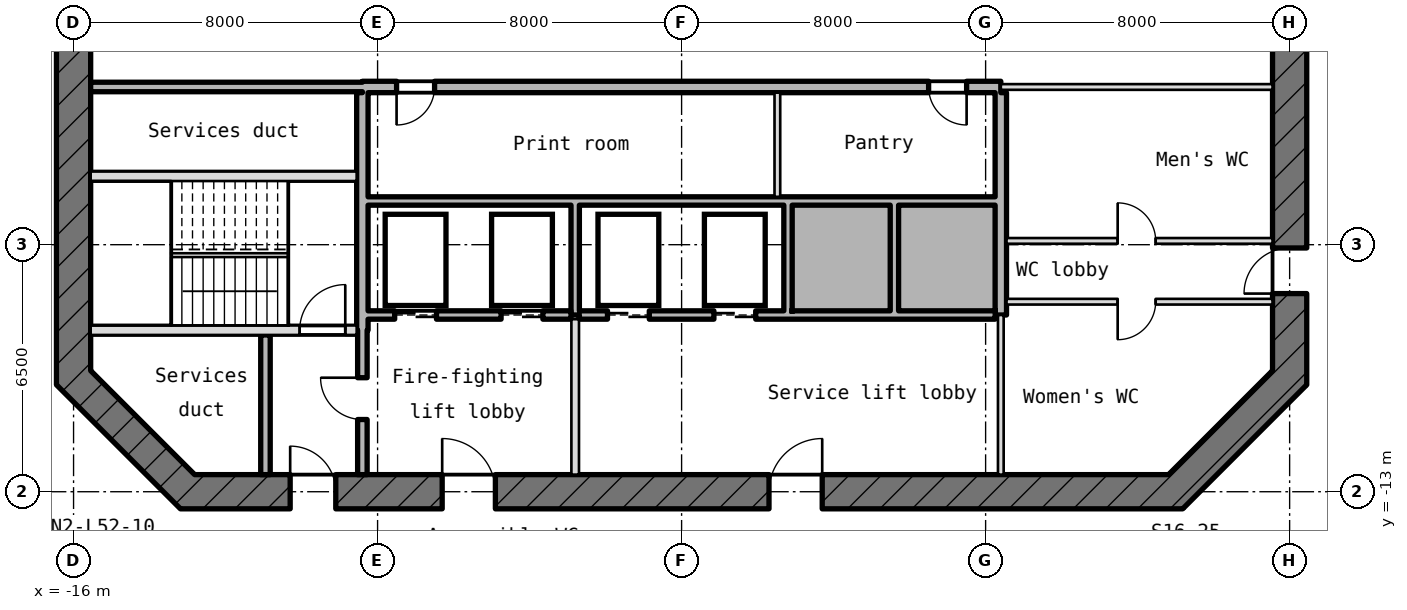
"""IFC4 building model, lengths in metres.
Left out: names, types, materials, properties, quantities, classifications, styles, units other than length and angle.
Written with IfcOpenShell. Run it as: python <this file> out.ifc"""

import sys

from ifc_helpers import new_model, si_unit, direction, frame, frame_2d, origin, place, context, subcontext, project, spatial, rectangle, extrude, element, fill, save


model = new_model("IFC4")
c1 = context("Model", 3, precision=1e-05, world=origin(), true_north=direction((0.0, 1.0)))
c2 = subcontext(c1, "Body", "Model", "MODEL_VIEW")
j1 = project(units=[si_unit("LENGTHUNIT", "METRE"), si_unit("PLANEANGLEUNIT", "RADIAN")], contexts=[c1])
p1 = place(None, origin())
s1 = spatial("IfcSite", under=j1, at=p1, CompositionType="ELEMENT")
p2 = place(p1, origin())
s2 = spatial("IfcBuilding", under=s1, at=p2, CompositionType="ELEMENT")
p3 = place(p2, frame((0.0, 0.0, 235.75)))
s3 = spatial("IfcBuildingStorey", under=s2, at=p3, CompositionType="ELEMENT", Elevation=235.75)
p4 = place(p3, frame((12.868, -13.132, -0.18), z_axis=(0.0, 0.0, 1.0), x_axis=(0.707106781187, 0.707106781187, 0.0)))
e1 = element("IfcWall", 1, at=p4, inside=s3, PredefinedType="SHEAR", context=c2, shape_type="SweptSolid", body=[
    extrude(rectangle(XDim=4.615, YDim=0.9, at=frame_2d((2.308, 0.0))), origin(), (0.0, 0.0, 1.0), 4.15),
])
p5 = place(p3, frame((16.0, -10.186, -0.18), z_axis=(0.0, 0.0, 1.0), x_axis=(0.0, 1.0, 0.0)))
e2 = element("IfcWall", 2, at=p5, inside=s3, PredefinedType="SHEAR", context=c2, shape_type="SweptSolid", body=[
    extrude(rectangle(XDim=20.373, YDim=0.9, at=frame_2d((10.186, 0.0))), origin(), (0.0, 0.0, 1.0), 4.15),
])
p6 = place(p5, frame((8.986, 0.0, 0.18)))
e3 = element("IfcOpeningElement", 3, at=p6, cuts=e2, PredefinedType="OPENING", context=c2, shape_type="SweptSolid", body=[
    extrude(rectangle(XDim=2.4, YDim=2.1, at=frame_2d((1.2, 1.05))), frame((0.0, 0.46, 0.0), z_axis=(0.0, -1.0, 0.0), x_axis=(1.0, 0.0, 0.0)), (0.0, 0.0, 1.0), 0.92),
])
p7 = place(p5, frame((13.586, 0.0, 0.18)))
e4 = element("IfcOpeningElement", 4, at=p7, cuts=e2, PredefinedType="OPENING", context=c2, shape_type="SweptSolid", body=[
    extrude(rectangle(XDim=1.2, YDim=2.1, at=frame_2d((0.6, 1.05))), frame((0.0, 0.46, 0.0), z_axis=(0.0, -1.0, 0.0), x_axis=(1.0, 0.0, 0.0)), (0.0, 0.0, 1.0), 0.92),
])
p8 = place(p5, frame((2.4, 0.0, 0.18)))
e5 = element("IfcOpeningElement", 5, at=p8, cuts=e2, PredefinedType="OPENING", context=c2, shape_type="SweptSolid", body=[
    extrude(rectangle(XDim=1.2, YDim=2.1, at=frame_2d((0.6, 1.05))), frame((0.0, 0.46, 0.0), z_axis=(0.0, -1.0, 0.0), x_axis=(1.0, 0.0, 0.0)), (0.0, 0.0, 1.0), 0.92),
])
p9 = place(p3, frame((-16.0, 10.186, -0.18), z_axis=(0.0, 0.0, 1.0), x_axis=(0.0, -1.0, 0.0)))
e6 = element("IfcWall", 6, at=p9, inside=s3, PredefinedType="SHEAR", context=c2, shape_type="SweptSolid", body=[
    extrude(rectangle(XDim=20.373, YDim=0.9, at=frame_2d((10.186, 0.0))), origin(), (0.0, 0.0, 1.0), 4.15),
])
p10 = place(p9, frame((8.986, 0.0, 0.18)))
e7 = element("IfcOpeningElement", 7, at=p10, cuts=e6, PredefinedType="OPENING", context=c2, shape_type="SweptSolid", body=[
    extrude(rectangle(XDim=2.4, YDim=2.1, at=frame_2d((1.2, 1.05))), frame((0.0, 0.46, 0.0), z_axis=(0.0, -1.0, 0.0), x_axis=(1.0, 0.0, 0.0)), (0.0, 0.0, 1.0), 0.92),
])
p11 = place(p9, frame((5.586, 0.0, 0.18)))
e8 = element("IfcOpeningElement", 8, at=p11, cuts=e6, PredefinedType="OPENING", context=c2, shape_type="SweptSolid", body=[
    extrude(rectangle(XDim=1.2, YDim=2.1, at=frame_2d((0.6, 1.05))), frame((0.0, 0.46, 0.0), z_axis=(0.0, -1.0, 0.0), x_axis=(1.0, 0.0, 0.0)), (0.0, 0.0, 1.0), 0.92),
])
p12 = place(p3, frame((-16.132, -9.868, -0.18), z_axis=(0.0, 0.0, 1.0), x_axis=(0.707106781187, -0.707106781187, 0.0)))
e9 = element("IfcWall", 9, at=p12, inside=s3, PredefinedType="SHEAR", context=c2, shape_type="SweptSolid", body=[
    extrude(rectangle(XDim=4.615, YDim=0.9, at=frame_2d((2.308, 0.0))), origin(), (0.0, 0.0, 1.0), 4.15),
])
p13 = place(p3, frame((-13.186, -13.0, -0.18), z_axis=(0.0, 0.0, 1.0), x_axis=(1.0, 0.0, 0.0)))
e10 = element("IfcWall", 10, at=p13, inside=s3, PredefinedType="SHEAR", context=c2, shape_type="SweptSolid", body=[
    extrude(rectangle(XDim=26.373, YDim=0.9, at=frame_2d((13.186, 0.0))), origin(), (0.0, 0.0, 1.0), 4.15),
])
p14 = place(p13, frame((2.886, 0.0, 0.18)))
e11 = element("IfcOpeningElement", 11, at=p14, cuts=e10, PredefinedType="OPENING", context=c2, shape_type="SweptSolid", body=[
    extrude(rectangle(XDim=1.2, YDim=2.1, at=frame_2d((0.6, 1.05))), frame((0.0, 0.46, 0.0), z_axis=(0.0, -1.0, 0.0), x_axis=(1.0, 0.0, 0.0)), (0.0, 0.0, 1.0), 0.92),
])
p15 = place(p13, frame((6.886, 0.0, 0.18)))
e12 = element("IfcOpeningElement", 12, at=p15, cuts=e10, PredefinedType="OPENING", context=c2, shape_type="SweptSolid", body=[
    extrude(rectangle(XDim=1.4, YDim=2.1, at=frame_2d((0.7, 1.05))), frame((0.0, 0.46, 0.0), z_axis=(0.0, -1.0, 0.0), x_axis=(1.0, 0.0, 0.0)), (0.0, 0.0, 1.0), 0.92),
])
p16 = place(p13, frame((15.486, 0.0, 0.18)))
e13 = element("IfcOpeningElement", 13, at=p16, cuts=e10, PredefinedType="OPENING", context=c2, shape_type="SweptSolid", body=[
    extrude(rectangle(XDim=1.4, YDim=2.1, at=frame_2d((0.7, 1.05))), frame((0.0, 0.46, 0.0), z_axis=(0.0, -1.0, 0.0), x_axis=(1.0, 0.0, 0.0)), (0.0, 0.0, 1.0), 0.92),
])
p17 = place(p3, frame((-15.55, -8.75, -0.18), z_axis=(0.0, 0.0, 1.0), x_axis=(1.0, 0.0, 0.0)))
e14 = element("IfcWall", 14, at=p17, inside=s3, PredefinedType="SHEAR", context=c2, shape_type="SweptSolid", body=[
    extrude(rectangle(XDim=7.0, YDim=0.25, at=frame_2d((3.5, 0.0))), origin(), (0.0, 0.0, 1.0), 4.15),
])
p18 = place(p17, frame((5.5, 0.0, 0.18)))
e15 = element("IfcOpeningElement", 15, at=p18, cuts=e14, PredefinedType="OPENING", context=c2, shape_type="SweptSolid", body=[
    extrude(rectangle(XDim=1.2, YDim=2.1, at=frame_2d((0.6, 1.05))), frame((0.0, 0.135, 0.0), z_axis=(0.0, -1.0, 0.0), x_axis=(1.0, 0.0, 0.0)), (0.0, 0.0, 1.0), 0.27),
])
p19 = place(p3, frame((-8.25, -8.35, 0.0), z_axis=(0.0, 0.0, 1.0), x_axis=(1.0, 0.0, 0.0)))
e16 = element("IfcWall", 16, at=p19, inside=s3, PredefinedType="STANDARD", context=c2, shape_type="SweptSolid", body=[
    extrude(rectangle(XDim=5.34, YDim=0.22, at=frame_2d((2.67, 0.0))), origin(), (0.0, 0.0, 1.0), 3.97),
])
p20 = place(p19, frame((0.7, 0.0, 0.0)))
e17 = element("IfcOpeningElement", 17, at=p20, cuts=e16, PredefinedType="OPENING", context=c2, shape_type="SweptSolid", body=[
    extrude(rectangle(XDim=1.1, YDim=2.1, at=frame_2d((0.55, 1.05))), frame((0.0, 0.12, 0.0), z_axis=(0.0, -1.0, 0.0), x_axis=(1.0, 0.0, 0.0)), (0.0, 0.0, 1.0), 0.24),
])
p21 = place(p19, frame((3.5, 0.0, 0.0)))
e18 = element("IfcOpeningElement", 18, at=p21, cuts=e16, PredefinedType="OPENING", context=c2, shape_type="SweptSolid", body=[
    extrude(rectangle(XDim=1.1, YDim=2.1, at=frame_2d((0.55, 1.05))), frame((0.0, 0.12, 0.0), z_axis=(0.0, -1.0, 0.0), x_axis=(1.0, 0.0, 0.0)), (0.0, 0.0, 1.0), 0.24),
])
p22 = place(p3, frame((-2.69, -8.35, 0.0), z_axis=(0.0, 0.0, 1.0), x_axis=(1.0, 0.0, 0.0)))
e19 = element("IfcWall", 19, at=p22, inside=s3, PredefinedType="STANDARD", context=c2, shape_type="SweptSolid", body=[
    extrude(rectangle(XDim=10.94, YDim=0.22, at=frame_2d((5.47, 0.0))), origin(), (0.0, 0.0, 1.0), 3.97),
])
p23 = place(p22, frame((0.74, 0.0, 0.0)))
e20 = element("IfcOpeningElement", 20, at=p23, cuts=e19, PredefinedType="OPENING", context=c2, shape_type="SweptSolid", body=[
    extrude(rectangle(XDim=1.1, YDim=2.1, at=frame_2d((0.55, 1.05))), frame((0.0, 0.12, 0.0), z_axis=(0.0, -1.0, 0.0), x_axis=(1.0, 0.0, 0.0)), (0.0, 0.0, 1.0), 0.24),
])
p24 = place(p22, frame((3.54, 0.0, 0.0)))
e21 = element("IfcOpeningElement", 21, at=p24, cuts=e19, PredefinedType="OPENING", context=c2, shape_type="SweptSolid", body=[
    extrude(rectangle(XDim=1.1, YDim=2.1, at=frame_2d((0.55, 1.05))), frame((0.0, 0.12, 0.0), z_axis=(0.0, -1.0, 0.0), x_axis=(1.0, 0.0, 0.0)), (0.0, 0.0, 1.0), 0.24),
])
p25 = place(p3, frame((8.55, -8.0, 0.0), z_axis=(0.0, 0.0, 1.0), x_axis=(1.0, 0.0, 0.0)))
e22 = element("IfcWall", 22, at=p25, inside=s3, PredefinedType="PARTITIONING", context=c2, shape_type="SweptSolid", body=[
    extrude(rectangle(XDim=7.0, YDim=0.15, at=frame_2d((3.5, 0.0))), origin(), (0.0, 0.0, 1.0), 3.97),
])
p26 = place(p25, frame((2.925, 0.0, 0.0)))
e23 = element("IfcOpeningElement", 23, at=p26, cuts=e22, PredefinedType="OPENING", context=c2, shape_type="SweptSolid", body=[
    extrude(rectangle(XDim=1.0, YDim=2.1, at=frame_2d((0.5, 1.05))), frame((0.0, 0.085, 0.0), z_axis=(0.0, -1.0, 0.0), x_axis=(1.0, 0.0, 0.0)), (0.0, 0.0, 1.0), 0.17),
])
p27 = place(p3, frame((8.55, -6.4, 0.0), z_axis=(0.0, 0.0, 1.0), x_axis=(1.0, 0.0, 0.0)))
e24 = element("IfcWall", 24, at=p27, inside=s3, PredefinedType="PARTITIONING", context=c2, shape_type="SweptSolid", body=[
    extrude(rectangle(XDim=7.0, YDim=0.15, at=frame_2d((3.5, 0.0))), origin(), (0.0, 0.0, 1.0), 3.97),
])
p28 = place(p27, frame((2.925, 0.0, 0.0)))
e25 = element("IfcOpeningElement", 25, at=p28, cuts=e24, PredefinedType="OPENING", context=c2, shape_type="SweptSolid", body=[
    extrude(rectangle(XDim=1.0, YDim=2.1, at=frame_2d((0.5, 1.05))), frame((0.0, 0.085, 0.0), z_axis=(0.0, -1.0, 0.0), x_axis=(1.0, 0.0, 0.0)), (0.0, 0.0, 1.0), 0.17),
])
p29 = place(p3, frame((-8.25, -5.35, 0.0), z_axis=(0.0, 0.0, 1.0), x_axis=(1.0, 0.0, 0.0)))
e26 = element("IfcWall", 26, at=p29, inside=s3, PredefinedType="STANDARD", context=c2, shape_type="SweptSolid", body=[
    extrude(rectangle(XDim=16.5, YDim=0.22, at=frame_2d((8.25, 0.0))), origin(), (0.0, 0.0, 1.0), 3.97),
])
p30 = place(p3, frame((-15.55, -4.7, -0.18), z_axis=(0.0, 0.0, 1.0), x_axis=(1.0, 0.0, 0.0)))
e27 = element("IfcWall", 27, at=p30, inside=s3, PredefinedType="SHEAR", context=c2, shape_type="SweptSolid", body=[
    extrude(rectangle(XDim=7.0, YDim=0.25, at=frame_2d((3.5, 0.0))), origin(), (0.0, 0.0, 1.0), 4.15),
])
p31 = place(p3, frame((-15.55, -2.35, 0.0), z_axis=(0.0, 0.0, 1.0), x_axis=(1.0, 0.0, 0.0)))
e28 = element("IfcWall", 28, at=p31, inside=s3, PredefinedType="STANDARD", context=c2, shape_type="SweptSolid", body=[
    extrude(rectangle(XDim=7.15, YDim=0.25, at=frame_2d((3.575, 0.0))), origin(), (0.0, 0.0, 1.0), 3.97),
])
p32 = place(p3, frame((-8.4, -2.35, -0.18), z_axis=(0.0, 0.0, 1.0), x_axis=(1.0, 0.0, 0.0)))
e29 = element("IfcWall", 29, at=p32, inside=s3, PredefinedType="SHEAR", context=c2, shape_type="SweptSolid", body=[
    extrude(rectangle(XDim=16.8, YDim=0.3, at=frame_2d((8.4, 0.0))), origin(), (0.0, 0.0, 1.0), 4.15),
])
p33 = place(p32, frame((0.9, 0.0, 0.18)))
e30 = element("IfcOpeningElement", 30, at=p33, cuts=e29, PredefinedType="OPENING", context=c2, shape_type="SweptSolid", body=[
    extrude(rectangle(XDim=1.0, YDim=2.1, at=frame_2d((0.5, 1.05))), frame((0.0, 0.16, 0.0), z_axis=(0.0, -1.0, 0.0), x_axis=(1.0, 0.0, 0.0)), (0.0, 0.0, 1.0), 0.32),
])
p34 = place(p32, frame((14.9, 0.0, 0.18)))
e31 = element("IfcOpeningElement", 31, at=p34, cuts=e29, PredefinedType="OPENING", context=c2, shape_type="SweptSolid", body=[
    extrude(rectangle(XDim=1.0, YDim=2.1, at=frame_2d((0.5, 1.05))), frame((0.0, 0.16, 0.0), z_axis=(0.0, -1.0, 0.0), x_axis=(1.0, 0.0, 0.0)), (0.0, 0.0, 1.0), 0.32),
])
p35 = place(p3, frame((8.4, -2.35, 0.0), z_axis=(0.0, 0.0, 1.0), x_axis=(1.0, 0.0, 0.0)))
e32 = element("IfcWall", 32, at=p35, inside=s3, PredefinedType="PARTITIONING", context=c2, shape_type="SweptSolid", body=[
    extrude(rectangle(XDim=7.15, YDim=0.15, at=frame_2d((3.575, 0.0))), origin(), (0.0, 0.0, 1.0), 3.97),
])
p36 = place(p3, frame((-10.95, -12.55, 0.0), z_axis=(0.0, 0.0, 1.0), x_axis=(0.0, 1.0, 0.0)))
e33 = element("IfcWall", 33, at=p36, inside=s3, PredefinedType="STANDARD", context=c2, shape_type="SweptSolid", body=[
    extrude(rectangle(XDim=3.675, YDim=0.25, at=frame_2d((1.837, 0.0))), origin(), (0.0, 0.0, 1.0), 3.97),
])
p37 = place(p3, frame((-8.4, -12.55, 0.0), z_axis=(0.0, 0.0, 1.0), x_axis=(0.0, 1.0, 0.0)))
e34 = element("IfcWall", 34, at=p37, inside=s3, PredefinedType="STANDARD", context=c2, shape_type="SweptSolid", body=[
    extrude(rectangle(XDim=3.8, YDim=0.25, at=frame_2d((1.9, 0.0))), origin(), (0.0, 0.0, 1.0), 3.97),
])
p38 = place(p37, frame((1.45, 0.0, 0.0)))
e35 = element("IfcOpeningElement", 35, at=p38, cuts=e34, PredefinedType="OPENING", context=c2, shape_type="SweptSolid", body=[
    extrude(rectangle(XDim=1.1, YDim=2.1, at=frame_2d((0.55, 1.05))), frame((0.0, 0.135, 0.0), z_axis=(0.0, -1.0, 0.0), x_axis=(1.0, 0.0, 0.0)), (0.0, 0.0, 1.0), 0.27),
])
p39 = place(p3, frame((-8.4, -8.75, -0.18), z_axis=(0.0, 0.0, 1.0), x_axis=(0.0, 1.0, 0.0)))
e36 = element("IfcWall", 36, at=p39, inside=s3, PredefinedType="SHEAR", context=c2, shape_type="SweptSolid", body=[
    extrude(rectangle(XDim=6.25, YDim=0.3, at=frame_2d((3.125, 0.0))), origin(), (0.0, 0.0, 1.0), 4.15),
])
p40 = place(p3, frame((-2.8, -12.55, 0.0), z_axis=(0.0, 0.0, 1.0), x_axis=(0.0, 1.0, 0.0)))
e37 = element("IfcWall", 37, at=p40, inside=s3, PredefinedType="PARTITIONING", context=c2, shape_type="SweptSolid", body=[
    extrude(rectangle(XDim=4.09, YDim=0.2, at=frame_2d((2.045, 0.0))), origin(), (0.0, 0.0, 1.0), 3.97),
])
p41 = place(p3, frame((-2.8, -8.35, 0.0), z_axis=(0.0, 0.0, 1.0), x_axis=(0.0, 1.0, 0.0)))
e38 = element("IfcWall", 38, at=p41, inside=s3, PredefinedType="STANDARD", context=c2, shape_type="SweptSolid", body=[
    extrude(rectangle(XDim=2.89, YDim=0.22, at=frame_2d((1.445, 0.0))), origin(), (0.0, 0.0, 1.0), 3.97),
])
p42 = place(p3, frame((2.52, -5.24, 0.0), z_axis=(0.0, 0.0, 1.0), x_axis=(0.0, 1.0, 0.0)))
e39 = element("IfcWall", 39, at=p42, inside=s3, PredefinedType="PARTITIONING", context=c2, shape_type="SweptSolid", body=[
    extrude(rectangle(XDim=2.74, YDim=0.15, at=frame_2d((1.37, 0.0))), origin(), (0.0, 0.0, 1.0), 3.97),
])
for number, where, z_axis, x_axis in (
    (40, (2.8, -8.24, 0.0), (0.0, 0.0, 1.0), (0.0, 1.0, 0.0)),
    (41, (5.6, -8.24, 0.0), (0.0, 0.0, 1.0), (0.0, 1.0, 0.0)),
):
    element("IfcWall", number, at=place(p3, frame(where, z_axis=z_axis, x_axis=x_axis)), inside=s3, PredefinedType="STANDARD", context=c2, shape_type="SweptSolid", body=[
        extrude(rectangle(XDim=2.78, YDim=0.22, at=frame_2d((1.39, 0.0))), origin(), (0.0, 0.0, 1.0), 3.97),
    ])
p43 = place(p3, frame((8.4, -12.55, 0.0), z_axis=(0.0, 0.0, 1.0), x_axis=(0.0, 1.0, 0.0)))
e42 = element("IfcWall", 42, at=p43, inside=s3, PredefinedType="PARTITIONING", context=c2, shape_type="SweptSolid", body=[
    extrude(rectangle(XDim=4.2, YDim=0.15, at=frame_2d((2.1, 0.0))), origin(), (0.0, 0.0, 1.0), 3.97),
])
p44 = place(p3, frame((8.4, -8.35, -0.18), z_axis=(0.0, 0.0, 1.0), x_axis=(0.0, 1.0, 0.0)))
e43 = element("IfcWall", 43, at=p44, inside=s3, PredefinedType="SHEAR", context=c2, shape_type="SweptSolid", body=[
    extrude(rectangle(XDim=5.85, YDim=0.3, at=frame_2d((2.925, 0.0))), origin(), (0.0, 0.0, 1.0), 4.15),
])
p45 = place(p20, origin())
e44 = element("IfcDoor", 44, at=p45, inside=s3, OperationType="DOUBLE_DOOR_SLIDING", PredefinedType="DOOR", context=c2, shape_type="SweptSolid", body=[
    extrude(rectangle(XDim=1.1, YDim=2.1, at=frame_2d((0.55, 1.05))), frame((0.0, 0.025, 0.0), z_axis=(0.0, -1.0, 0.0), x_axis=(1.0, 0.0, 0.0)), (0.0, 0.0, 1.0), 0.05),
])
fill(e17, e44)
p46 = place(p21, origin())
e45 = element("IfcDoor", 45, at=p46, inside=s3, OperationType="DOUBLE_DOOR_SLIDING", PredefinedType="DOOR", context=c2, shape_type="SweptSolid", body=[
    extrude(rectangle(XDim=1.1, YDim=2.1, at=frame_2d((0.55, 1.05))), frame((0.0, 0.025, 0.0), z_axis=(0.0, -1.0, 0.0), x_axis=(1.0, 0.0, 0.0)), (0.0, 0.0, 1.0), 0.05),
])
fill(e18, e45)
p47 = place(p23, origin())
e46 = element("IfcDoor", 46, at=p47, inside=s3, OperationType="DOUBLE_DOOR_SLIDING", PredefinedType="DOOR", context=c2, shape_type="SweptSolid", body=[
    extrude(rectangle(XDim=1.1, YDim=2.1, at=frame_2d((0.55, 1.05))), frame((0.0, 0.025, 0.0), z_axis=(0.0, -1.0, 0.0), x_axis=(1.0, 0.0, 0.0)), (0.0, 0.0, 1.0), 0.05),
])
fill(e20, e46)
p48 = place(p24, origin())
e47 = element("IfcDoor", 47, at=p48, inside=s3, OperationType="DOUBLE_DOOR_SLIDING", PredefinedType="DOOR", context=c2, shape_type="SweptSolid", body=[
    extrude(rectangle(XDim=1.1, YDim=2.1, at=frame_2d((0.55, 1.05))), frame((0.0, 0.025, 0.0), z_axis=(0.0, -1.0, 0.0), x_axis=(1.0, 0.0, 0.0)), (0.0, 0.0, 1.0), 0.05),
])
fill(e21, e47)
p49 = place(p18, origin())
e48 = element("IfcDoor", 48, at=p49, inside=s3, OperationType="SINGLE_SWING_RIGHT", PredefinedType="DOOR", context=c2, shape_type="SweptSolid", body=[
    extrude(rectangle(XDim=1.2, YDim=2.1, at=frame_2d((0.6, 1.05))), frame((0.0, 0.025, 0.0), z_axis=(0.0, -1.0, 0.0), x_axis=(1.0, 0.0, 0.0)), (0.0, 0.0, 1.0), 0.05),
])
fill(e15, e48)
p50 = place(p38, origin())
e49 = element("IfcDoor", 49, at=p50, inside=s3, OperationType="SINGLE_SWING_RIGHT", PredefinedType="DOOR", context=c2, shape_type="SweptSolid", body=[
    extrude(rectangle(XDim=1.1, YDim=2.1, at=frame_2d((0.55, 1.05))), frame((0.0, 0.025, 0.0), z_axis=(0.0, -1.0, 0.0), x_axis=(1.0, 0.0, 0.0)), (0.0, 0.0, 1.0), 0.05),
])
fill(e35, e49)
p51 = place(p14, origin())
e50 = element("IfcDoor", 50, at=p51, inside=s3, OperationType="SINGLE_SWING_RIGHT", PredefinedType="DOOR", context=c2, shape_type="SweptSolid", body=[
    extrude(rectangle(XDim=1.2, YDim=2.1, at=frame_2d((0.6, 1.05))), frame((0.0, 0.025, 0.0), z_axis=(0.0, -1.0, 0.0), x_axis=(1.0, 0.0, 0.0)), (0.0, 0.0, 1.0), 0.05),
])
fill(e11, e50)
p52 = place(p15, origin())
e51 = element("IfcDoor", 51, at=p52, inside=s3, OperationType="SINGLE_SWING_RIGHT", PredefinedType="DOOR", context=c2, shape_type="SweptSolid", body=[
    extrude(rectangle(XDim=1.4, YDim=2.1, at=frame_2d((0.7, 1.05))), frame((0.0, 0.025, 0.0), z_axis=(0.0, -1.0, 0.0), x_axis=(1.0, 0.0, 0.0)), (0.0, 0.0, 1.0), 0.05),
])
fill(e12, e51)
p53 = place(p16, origin())
e52 = element("IfcDoor", 52, at=p53, inside=s3, OperationType="SINGLE_SWING_RIGHT", PredefinedType="DOOR", context=c2, shape_type="SweptSolid", body=[
    extrude(rectangle(XDim=1.4, YDim=2.1, at=frame_2d((0.7, 1.05))), frame((0.0, 0.025, 0.0), z_axis=(0.0, -1.0, 0.0), x_axis=(1.0, 0.0, 0.0)), (0.0, 0.0, 1.0), 0.05),
])
fill(e13, e52)
p54 = place(p33, frame((1.0, 0.0, 0.0), z_axis=(0.0, 0.0, 1.0), x_axis=(-1.0, 0.0, 0.0)))
e53 = element("IfcDoor", 53, at=p54, inside=s3, OperationType="SINGLE_SWING_LEFT", PredefinedType="DOOR", context=c2, shape_type="SweptSolid", body=[
    extrude(rectangle(XDim=1.0, YDim=2.1, at=frame_2d((0.5, 1.05))), frame((0.0, 0.025, 0.0), z_axis=(0.0, -1.0, 0.0), x_axis=(1.0, 0.0, 0.0)), (0.0, 0.0, 1.0), 0.05),
])
fill(e30, e53)
p55 = place(p34, frame((1.0, 0.0, 0.0), z_axis=(0.0, 0.0, 1.0), x_axis=(-1.0, 0.0, 0.0)))
e54 = element("IfcDoor", 54, at=p55, inside=s3, OperationType="SINGLE_SWING_LEFT", PredefinedType="DOOR", context=c2, shape_type="SweptSolid", body=[
    extrude(rectangle(XDim=1.0, YDim=2.1, at=frame_2d((0.5, 1.05))), frame((0.0, 0.025, 0.0), z_axis=(0.0, -1.0, 0.0), x_axis=(1.0, 0.0, 0.0)), (0.0, 0.0, 1.0), 0.05),
])
fill(e31, e54)
p56 = place(p28, origin())
e55 = element("IfcDoor", 55, at=p56, inside=s3, OperationType="SINGLE_SWING_RIGHT", PredefinedType="DOOR", context=c2, shape_type="SweptSolid", body=[
    extrude(rectangle(XDim=1.0, YDim=2.1, at=frame_2d((0.5, 1.05))), frame((0.0, 0.025, 0.0), z_axis=(0.0, -1.0, 0.0), x_axis=(1.0, 0.0, 0.0)), (0.0, 0.0, 1.0), 0.05),
])
fill(e25, e55)
p57 = place(p8, origin())
e56 = element("IfcDoor", 56, at=p57, inside=s3, OperationType="SINGLE_SWING_RIGHT", PredefinedType="DOOR", context=c2, shape_type="SweptSolid", body=[
    extrude(rectangle(XDim=1.2, YDim=2.1, at=frame_2d((0.6, 1.05))), frame((0.0, 0.025, 0.0), z_axis=(0.0, -1.0, 0.0), x_axis=(1.0, 0.0, 0.0)), (0.0, 0.0, 1.0), 0.05),
])
fill(e5, e56)
p58 = place(p26, frame((1.0, 0.0, 0.0), z_axis=(0.0, 0.0, 1.0), x_axis=(-1.0, 0.0, 0.0)))
e57 = element("IfcDoor", 57, at=p58, inside=s3, OperationType="SINGLE_SWING_LEFT", PredefinedType="DOOR", context=c2, shape_type="SweptSolid", body=[
    extrude(rectangle(XDim=1.0, YDim=2.1, at=frame_2d((0.5, 1.05))), frame((0.0, 0.025, 0.0), z_axis=(0.0, -1.0, 0.0), x_axis=(1.0, 0.0, 0.0)), (0.0, 0.0, 1.0), 0.05),
])
fill(e23, e57)
save(model, sys.argv[1])
